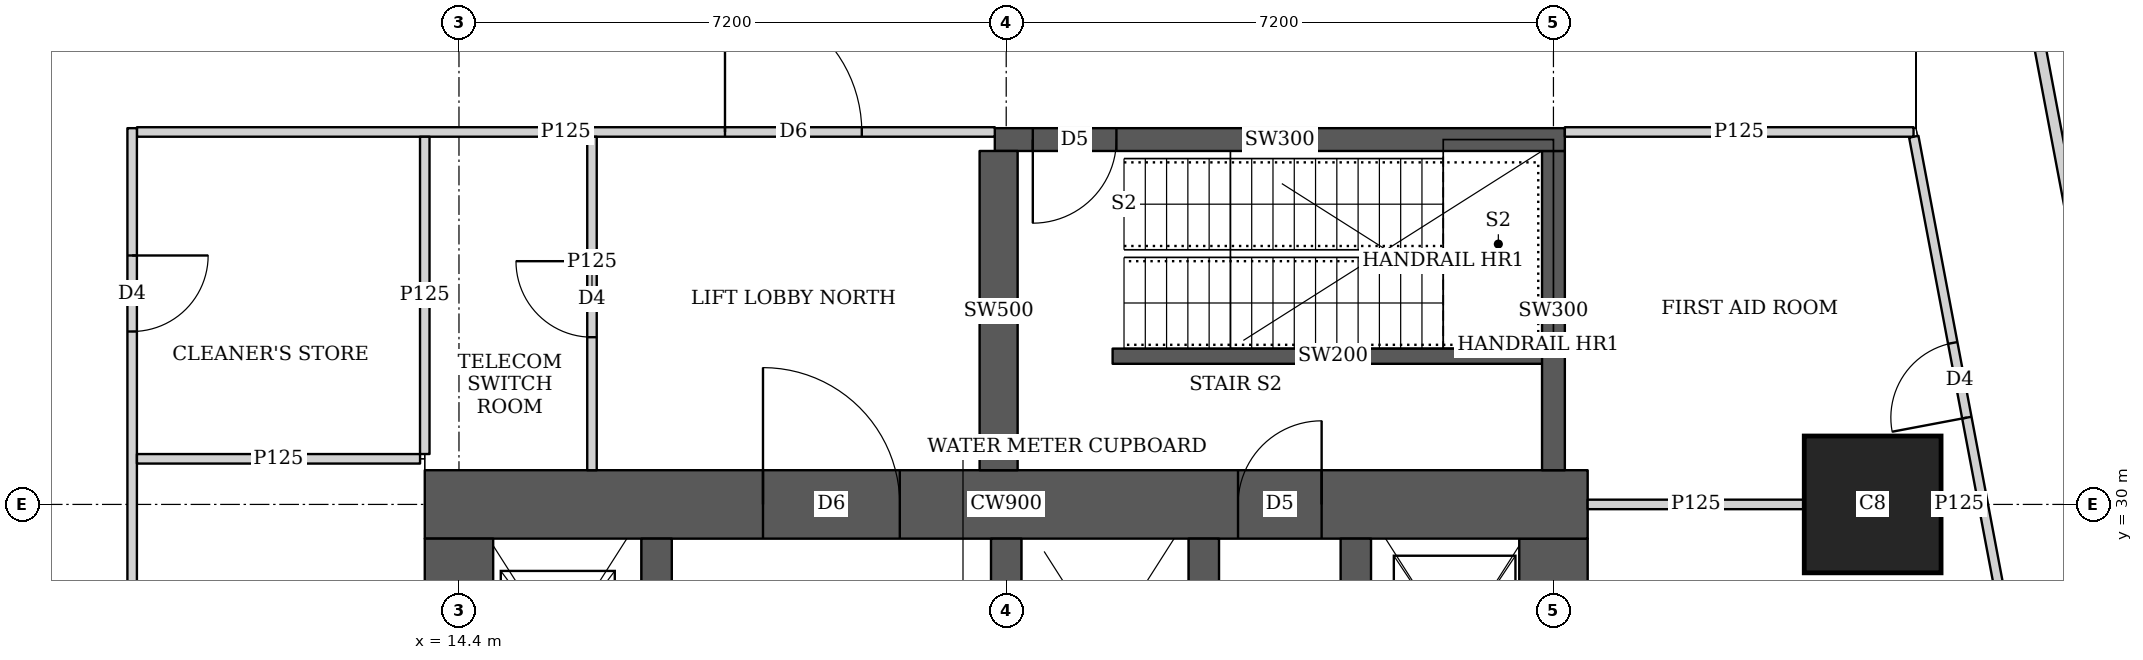
"""IFC4 building model, lengths in metres.
Left out: names, types, materials, properties, quantities, classifications, styles, units other than length and angle.
Written with IfcOpenShell. Run it as: python <this file> out.ifc"""

import sys

from ifc_helpers import new_model, si_unit, direction, frame, frame_2d, origin, origin_2d, place, context, subcontext, project, spatial, rectangle, extrude, element, fill, save


model = new_model("IFC4")
c1 = context("Model", 3, precision=1e-05, world=origin(), true_north=direction((0.0, 1.0)))
c2 = subcontext(c1, "Body", "Model", "MODEL_VIEW")
j1 = project(units=[si_unit("LENGTHUNIT", "METRE"), si_unit("PLANEANGLEUNIT", "RADIAN")], contexts=[c1])
p1 = place(None, origin())
s1 = spatial("IfcSite", under=j1, at=p1, CompositionType="ELEMENT")
p2 = place(p1, origin())
s2 = spatial("IfcBuilding", under=s1, at=p2, CompositionType="ELEMENT")
p3 = place(p2, frame((0.0, 0.0, 72.5)))
s3 = spatial("IfcBuildingStorey", under=s2, at=p3, CompositionType="ELEMENT", Elevation=72.5)
p4 = place(p3, frame((33.0, 30.0, 0.0), z_axis=(0.0, 0.0, 1.0), x_axis=(1.0, 0.0, 0.0)))
e1 = element("IfcColumn", 1, at=p4, inside=s3, PredefinedType="COLUMN", context=c2, shape_type="SweptSolid", body=[
    extrude(rectangle(XDim=1.8, YDim=1.8, at=origin_2d()), origin(), (0.0, 0.0, 1.0), 5.4),
])
p5 = place(p3, frame((13.95, 30.0, 0.0), z_axis=(0.0, 0.0, 1.0), x_axis=(1.0, 0.0, 0.0)))
e2 = element("IfcWall", 2, at=p5, inside=s3, PredefinedType="SHEAR", context=c2, shape_type="SweptSolid", body=[
    extrude(rectangle(XDim=15.3, YDim=0.9, at=frame_2d((7.65, 0.0))), origin(), (0.0, 0.0, 1.0), 5.4),
])
p6 = place(p5, frame((4.45, 0.0, 0.0)))
e3 = element("IfcOpeningElement", 3, at=p6, cuts=e2, PredefinedType="OPENING", context=c2, shape_type="SweptSolid", body=[
    extrude(rectangle(XDim=1.8, YDim=2.1, at=frame_2d((0.9, 1.05))), frame((0.0, 0.46, 0.0), z_axis=(0.0, -1.0, 0.0), x_axis=(1.0, 0.0, 0.0)), (0.0, 0.0, 1.0), 0.92),
])
p7 = place(p5, frame((10.7, 0.0, 0.0)))
e4 = element("IfcOpeningElement", 4, at=p7, cuts=e2, PredefinedType="OPENING", context=c2, shape_type="SweptSolid", body=[
    extrude(rectangle(XDim=1.1, YDim=2.1, at=frame_2d((0.55, 1.05))), frame((0.0, 0.46, 0.0), z_axis=(0.0, -1.0, 0.0), x_axis=(1.0, 0.0, 0.0)), (0.0, 0.0, 1.0), 0.92),
])
for number, where, z_axis, x_axis in (
    (5, (14.4, 15.45, 0.0), (0.0, 0.0, 1.0), (0.0, 1.0, 0.0)),
    (6, (28.8, 15.45, 0.0), (0.0, 0.0, 1.0), (0.0, 1.0, 0.0)),
):
    element("IfcWall", number, at=place(p3, frame(where, z_axis=z_axis, x_axis=x_axis)), inside=s3, PredefinedType="SHEAR", context=c2, shape_type="SweptSolid", body=[
        extrude(rectangle(XDim=14.1, YDim=0.9, at=frame_2d((7.05, 0.0))), origin(), (0.0, 0.0, 1.0), 5.4),
    ])
p8 = place(p3, frame((17.0, 15.45, 0.0), z_axis=(0.0, 0.0, 1.0), x_axis=(0.0, 1.0, 0.0)))
e7 = element("IfcWall", 7, at=p8, inside=s3, PredefinedType="SHEAR", context=c2, shape_type="SweptSolid", body=[
    extrude(rectangle(XDim=14.1, YDim=0.4, at=frame_2d((7.05, 0.0))), origin(), (0.0, 0.0, 1.0), 5.4),
])
p9 = place(p8, frame((0.875, 0.0, 0.0)))
e8 = element("IfcOpeningElement", 8, at=p9, cuts=e7, PredefinedType="OPENING", context=c2, shape_type="SweptSolid", body=[
    extrude(rectangle(XDim=1.1, YDim=2.1, at=frame_2d((0.55, 1.05))), frame((0.0, 0.21, 0.0), z_axis=(0.0, -1.0, 0.0), x_axis=(1.0, 0.0, 0.0)), (0.0, 0.0, 1.0), 0.42),
])
p10 = place(p8, frame((4.625, 0.0, 0.0)))
e9 = element("IfcOpeningElement", 9, at=p10, cuts=e7, PredefinedType="OPENING", context=c2, shape_type="SweptSolid", body=[
    extrude(rectangle(XDim=1.1, YDim=2.1, at=frame_2d((0.55, 1.05))), frame((0.0, 0.21, 0.0), z_axis=(0.0, -1.0, 0.0), x_axis=(1.0, 0.0, 0.0)), (0.0, 0.0, 1.0), 0.42),
])
p11 = place(p8, frame((8.375, 0.0, 0.0)))
e10 = element("IfcOpeningElement", 10, at=p11, cuts=e7, PredefinedType="OPENING", context=c2, shape_type="SweptSolid", body=[
    extrude(rectangle(XDim=1.1, YDim=2.1, at=frame_2d((0.55, 1.05))), frame((0.0, 0.21, 0.0), z_axis=(0.0, -1.0, 0.0), x_axis=(1.0, 0.0, 0.0)), (0.0, 0.0, 1.0), 0.42),
])
p12 = place(p8, frame((12.125, 0.0, 0.0)))
e11 = element("IfcOpeningElement", 11, at=p12, cuts=e7, PredefinedType="OPENING", context=c2, shape_type="SweptSolid", body=[
    extrude(rectangle(XDim=1.1, YDim=2.1, at=frame_2d((0.55, 1.05))), frame((0.0, 0.21, 0.0), z_axis=(0.0, -1.0, 0.0), x_axis=(1.0, 0.0, 0.0)), (0.0, 0.0, 1.0), 0.42),
])
for number, where, z_axis, x_axis in (
    (12, (21.6, 15.45, 0.0), (0.0, 0.0, 1.0), (0.0, 1.0, 0.0)),
    (13, (24.2, 15.45, 0.0), (0.0, 0.0, 1.0), (0.0, 1.0, 0.0)),
):
    element("IfcWall", number, at=place(p3, frame(where, z_axis=z_axis, x_axis=x_axis)), inside=s3, PredefinedType="SHEAR", context=c2, shape_type="SweptSolid", body=[
        extrude(rectangle(XDim=14.1, YDim=0.4, at=frame_2d((7.05, 0.0))), origin(), (0.0, 0.0, 1.0), 5.4),
    ])
p13 = place(p3, frame((26.2, 26.45, 0.0), z_axis=(0.0, 0.0, 1.0), x_axis=(0.0, 1.0, 0.0)))
e14 = element("IfcWall", 14, at=p13, inside=s3, PredefinedType="SHEAR", context=c2, shape_type="SweptSolid", body=[
    extrude(rectangle(XDim=3.1, YDim=0.4, at=frame_2d((1.55, 0.0))), origin(), (0.0, 0.0, 1.0), 5.4),
])
p14 = place(p13, frame((1.075, 0.0, 0.0)))
e15 = element("IfcOpeningElement", 15, at=p14, cuts=e14, PredefinedType="OPENING", context=c2, shape_type="SweptSolid", body=[
    extrude(rectangle(XDim=1.2, YDim=2.1, at=frame_2d((0.6, 1.05))), frame((0.0, 0.21, 0.0), z_axis=(0.0, -1.0, 0.0), x_axis=(1.0, 0.0, 0.0)), (0.0, 0.0, 1.0), 0.42),
])
p15 = place(p3, frame((21.45, 34.8, 0.0), z_axis=(0.0, 0.0, 1.0), x_axis=(1.0, 0.0, 0.0)))
e16 = element("IfcWall", 16, at=p15, inside=s3, PredefinedType="SHEAR", context=c2, shape_type="SweptSolid", body=[
    extrude(rectangle(XDim=7.5, YDim=0.3, at=frame_2d((3.75, 0.0))), origin(), (0.0, 0.0, 1.0), 5.4),
])
p16 = place(p15, frame((0.5, 0.0, 0.0)))
e17 = element("IfcOpeningElement", 17, at=p16, cuts=e16, PredefinedType="OPENING", context=c2, shape_type="SweptSolid", body=[
    extrude(rectangle(XDim=1.1, YDim=2.1, at=frame_2d((0.55, 1.05))), frame((0.0, 0.16, 0.0), z_axis=(0.0, -1.0, 0.0), x_axis=(1.0, 0.0, 0.0)), (0.0, 0.0, 1.0), 0.32),
])
p17 = place(p3, frame((21.5, 30.45, 0.0), z_axis=(0.0, 0.0, 1.0), x_axis=(0.0, 1.0, 0.0)))
e18 = element("IfcWall", 18, at=p17, inside=s3, PredefinedType="SHEAR", context=c2, shape_type="SweptSolid", body=[
    extrude(rectangle(XDim=4.2, YDim=0.5, at=frame_2d((2.1, 0.0))), origin(), (0.0, 0.0, 1.0), 5.4),
])
p18 = place(p3, frame((28.8, 30.45, 0.0), z_axis=(0.0, 0.0, 1.0), x_axis=(0.0, 1.0, 0.0)))
e19 = element("IfcWall", 19, at=p18, inside=s3, PredefinedType="SHEAR", context=c2, shape_type="SweptSolid", body=[
    extrude(rectangle(XDim=4.2, YDim=0.3, at=frame_2d((2.1, 0.0))), origin(), (0.0, 0.0, 1.0), 5.4),
])
p19 = place(p3, frame((35.094, 36.585, 0.0), z_axis=(0.0, 0.0, 1.0), x_axis=(0.185591455861, -0.982626995106, 0.0)))
e20 = element("IfcWall", 20, at=p19, inside=s3, PredefinedType="SOLIDWALL", context=c2, shape_type="SweptSolid", body=[
    extrude(rectangle(XDim=35.735, YDim=0.15, at=frame_2d((17.867, 0.0))), origin(), (0.0, 0.0, 1.0), 3.35),
])
p20 = place(p19, frame((15.15, 0.0, 0.0)))
e21 = element("IfcOpeningElement", 21, at=p20, cuts=e20, PredefinedType="OPENING", context=c2, shape_type="SweptSolid", body=[
    extrude(rectangle(XDim=1.0, YDim=2.1, at=frame_2d((0.5, 1.05))), frame((0.0, 0.085, 0.0), z_axis=(0.0, -1.0, 0.0), x_axis=(1.0, 0.0, 0.0)), (0.0, 0.0, 1.0), 0.17),
])
p21 = place(p3, frame((10.1, 10.05, 0.0), z_axis=(0.0, 0.0, 1.0), x_axis=(0.0, 1.0, 0.0)))
e22 = element("IfcWall", 22, at=p21, inside=s3, PredefinedType="PARTITIONING", context=c2, shape_type="SweptSolid", body=[
    extrude(rectangle(XDim=24.9, YDim=0.125, at=frame_2d((12.45, 0.0))), origin(), (0.0, 0.0, 1.0), 3.55),
])
p22 = place(p21, frame((1.675, 0.0, 0.0)))
e23 = element("IfcOpeningElement", 23, at=p22, cuts=e22, PredefinedType="OPENING", context=c2, shape_type="SweptSolid", body=[
    extrude(rectangle(XDim=1.0, YDim=2.1, at=frame_2d((0.5, 1.05))), frame((0.0, 0.073, 0.0), z_axis=(0.0, -1.0, 0.0), x_axis=(1.0, 0.0, 0.0)), (0.0, 0.0, 1.0), 0.145),
])
p23 = place(p21, frame((16.0, 0.0, 0.0)))
e24 = element("IfcOpeningElement", 24, at=p23, cuts=e22, PredefinedType="OPENING", context=c2, shape_type="SweptSolid", body=[
    extrude(rectangle(XDim=1.0, YDim=2.1, at=frame_2d((0.5, 1.05))), frame((0.0, 0.073, 0.0), z_axis=(0.0, -1.0, 0.0), x_axis=(1.0, 0.0, 0.0)), (0.0, 0.0, 1.0), 0.145),
])
p24 = place(p21, frame((22.225, 0.0, 0.0)))
e25 = element("IfcOpeningElement", 25, at=p24, cuts=e22, PredefinedType="OPENING", context=c2, shape_type="SweptSolid", body=[
    extrude(rectangle(XDim=1.0, YDim=2.1, at=frame_2d((0.5, 1.05))), frame((0.0, 0.073, 0.0), z_axis=(0.0, -1.0, 0.0), x_axis=(1.0, 0.0, 0.0)), (0.0, 0.0, 1.0), 0.145),
])
p25 = place(p21, frame((6.025, 0.0, 0.0)))
e26 = element("IfcOpeningElement", 26, at=p25, cuts=e22, PredefinedType="OPENING", context=c2, shape_type="SweptSolid", body=[
    extrude(rectangle(XDim=1.0, YDim=2.1, at=frame_2d((0.5, 1.05))), frame((0.0, 0.073, 0.0), z_axis=(0.0, -1.0, 0.0), x_axis=(1.0, 0.0, 0.0)), (0.0, 0.0, 1.0), 0.145),
])
p26 = place(p21, frame((9.325, 0.0, 0.0)))
e27 = element("IfcOpeningElement", 27, at=p26, cuts=e22, PredefinedType="OPENING", context=c2, shape_type="SweptSolid", body=[
    extrude(rectangle(XDim=1.0, YDim=2.1, at=frame_2d((0.5, 1.05))), frame((0.0, 0.073, 0.0), z_axis=(0.0, -1.0, 0.0), x_axis=(1.0, 0.0, 0.0)), (0.0, 0.0, 1.0), 0.145),
])
p27 = place(p21, frame((11.1, 0.0, 0.0)))
e28 = element("IfcOpeningElement", 28, at=p27, cuts=e22, PredefinedType="OPENING", context=c2, shape_type="SweptSolid", body=[
    extrude(rectangle(XDim=1.0, YDim=2.1, at=frame_2d((0.5, 1.05))), frame((0.0, 0.073, 0.0), z_axis=(0.0, -1.0, 0.0), x_axis=(1.0, 0.0, 0.0)), (0.0, 0.0, 1.0), 0.145),
])
p28 = place(p3, frame((10.163, 30.6, 0.0), z_axis=(0.0, 0.0, 1.0), x_axis=(1.0, 0.0, 0.0)))
e29 = element("IfcWall", 29, at=p28, inside=s3, PredefinedType="PARTITIONING", context=c2, shape_type="SweptSolid", body=[
    extrude(rectangle(XDim=3.725, YDim=0.125, at=frame_2d((1.862, 0.0))), origin(), (0.0, 0.0, 1.0), 3.55),
])
p29 = place(p3, frame((13.95, 30.663, 0.0), z_axis=(0.0, 0.0, 1.0), x_axis=(0.0, 1.0, 0.0)))
e30 = element("IfcWall", 30, at=p29, inside=s3, PredefinedType="PARTITIONING", context=c2, shape_type="SweptSolid", body=[
    extrude(rectangle(XDim=4.174, YDim=0.125, at=frame_2d((2.087, 0.0))), origin(), (0.0, 0.0, 1.0), 3.55),
])
p30 = place(p3, frame((10.163, 34.9, 0.0), z_axis=(0.0, 0.0, 1.0), x_axis=(1.0, 0.0, 0.0)))
e31 = element("IfcWall", 31, at=p30, inside=s3, PredefinedType="PARTITIONING", context=c2, shape_type="SweptSolid", body=[
    extrude(rectangle(XDim=11.287, YDim=0.125, at=frame_2d((5.644, 0.0))), origin(), (0.0, 0.0, 1.0), 3.15),
])
p31 = place(p30, frame((7.737, 0.0, 0.0)))
e32 = element("IfcOpeningElement", 32, at=p31, cuts=e31, PredefinedType="OPENING", context=c2, shape_type="SweptSolid", body=[
    extrude(rectangle(XDim=1.8, YDim=2.1, at=frame_2d((0.9, 1.05))), frame((0.0, 0.073, 0.0), z_axis=(0.0, -1.0, 0.0), x_axis=(1.0, 0.0, 0.0)), (0.0, 0.0, 1.0), 0.145),
])
p32 = place(p3, frame((16.15, 30.45, 0.0), z_axis=(0.0, 0.0, 1.0), x_axis=(0.0, 1.0, 0.0)))
e33 = element("IfcWall", 33, at=p32, inside=s3, PredefinedType="PARTITIONING", context=c2, shape_type="SweptSolid", body=[
    extrude(rectangle(XDim=4.387, YDim=0.125, at=frame_2d((2.193, 0.0))), origin(), (0.0, 0.0, 1.0), 5.15),
])
p33 = place(p32, frame((1.75, 0.0, 0.0)))
e34 = element("IfcOpeningElement", 34, at=p33, cuts=e33, PredefinedType="OPENING", context=c2, shape_type="SweptSolid", body=[
    extrude(rectangle(XDim=1.0, YDim=2.1, at=frame_2d((0.5, 1.05))), frame((0.0, 0.073, 0.0), z_axis=(0.0, -1.0, 0.0), x_axis=(1.0, 0.0, 0.0)), (0.0, 0.0, 1.0), 0.145),
])
p34 = place(p3, frame((28.95, 34.9, 0.0), z_axis=(0.0, 0.0, 1.0), x_axis=(1.0, 0.0, 0.0)))
e35 = element("IfcWall", 35, at=p34, inside=s3, PredefinedType="PARTITIONING", context=c2, shape_type="SweptSolid", body=[
    extrude(rectangle(XDim=4.588, YDim=0.125, at=frame_2d((2.294, 0.0))), origin(), (0.0, 0.0, 1.0), 3.15),
])
p35 = place(p3, frame((38.202, 10.163, 0.0), z_axis=(0.0, 0.0, 1.0), x_axis=(-0.185610321132, 0.982623431783, 0.0)))
e36 = element("IfcWall", 36, at=p35, inside=s3, PredefinedType="PARTITIONING", context=c2, shape_type="SweptSolid", body=[
    extrude(rectangle(XDim=25.111, YDim=0.125, at=frame_2d((12.556, 0.0))), origin(), (0.0, 0.0, 1.0), 3.55),
])
p36 = place(p35, frame((0.708, 0.0, 0.0)))
e37 = element("IfcOpeningElement", 37, at=p36, cuts=e36, PredefinedType="OPENING", context=c2, shape_type="SweptSolid", body=[
    extrude(rectangle(XDim=1.0, YDim=2.1, at=frame_2d((0.5, 1.05))), frame((0.0, 0.073, 0.0), z_axis=(0.0, -1.0, 0.0), x_axis=(1.0, 0.0, 0.0)), (0.0, 0.0, 1.0), 0.145),
])
p37 = place(p35, frame((6.1, 0.0, 0.0)))
e38 = element("IfcOpeningElement", 38, at=p37, cuts=e36, PredefinedType="OPENING", context=c2, shape_type="SweptSolid", body=[
    extrude(rectangle(XDim=1.0, YDim=2.1, at=frame_2d((0.5, 1.05))), frame((0.0, 0.073, 0.0), z_axis=(0.0, -1.0, 0.0), x_axis=(1.0, 0.0, 0.0)), (0.0, 0.0, 1.0), 0.145),
])
p38 = place(p35, frame((13.378, 0.0, 0.0)))
e39 = element("IfcOpeningElement", 39, at=p38, cuts=e36, PredefinedType="OPENING", context=c2, shape_type="SweptSolid", body=[
    extrude(rectangle(XDim=1.0, YDim=2.1, at=frame_2d((0.5, 1.05))), frame((0.0, 0.073, 0.0), z_axis=(0.0, -1.0, 0.0), x_axis=(1.0, 0.0, 0.0)), (0.0, 0.0, 1.0), 0.145),
])
p39 = place(p35, frame((21.35, 0.0, 0.0)))
e40 = element("IfcOpeningElement", 40, at=p39, cuts=e36, PredefinedType="OPENING", context=c2, shape_type="SweptSolid", body=[
    extrude(rectangle(XDim=1.0, YDim=2.1, at=frame_2d((0.5, 1.05))), frame((0.0, 0.073, 0.0), z_axis=(0.0, -1.0, 0.0), x_axis=(1.0, 0.0, 0.0)), (0.0, 0.0, 1.0), 0.145),
])
p40 = place(p3, frame((29.25, 30.0, 0.0), z_axis=(0.0, 0.0, 1.0), x_axis=(1.0, 0.0, 0.0)))
e41 = element("IfcWall", 41, at=p40, inside=s3, PredefinedType="PARTITIONING", context=c2, shape_type="SweptSolid", body=[
    extrude(rectangle(XDim=2.849, YDim=0.125, at=frame_2d((1.425, 0.0))), origin(), (0.0, 0.0, 1.0), 3.55),
])
p41 = place(p3, frame((33.901, 30.0, 0.0), z_axis=(0.0, 0.0, 1.0), x_axis=(1.0, 0.0, 0.0)))
e42 = element("IfcWall", 42, at=p41, inside=s3, PredefinedType="PARTITIONING", context=c2, shape_type="SweptSolid", body=[
    extrude(rectangle(XDim=0.478, YDim=0.125, at=frame_2d((0.239, 0.0))), origin(), (0.0, 0.0, 1.0), 3.55),
])
p42 = place(p3, frame((23.0, 31.95, 0.0), z_axis=(0.0, 0.0, 1.0), x_axis=(1.0, 0.0, 0.0)))
e43 = element("IfcWall", 43, at=p42, inside=s3, PredefinedType="SHEAR", context=c2, shape_type="SweptSolid", body=[
    extrude(rectangle(XDim=5.8, YDim=0.2, at=frame_2d((2.9, 0.0))), origin(), (0.0, 0.0, 1.0), 5.4),
])
p43 = place(p24, origin())
e44 = element("IfcDoor", 44, at=p43, inside=s3, OperationType="SINGLE_SWING_LEFT", PredefinedType="DOOR", context=c2, shape_type="SweptSolid", body=[
    extrude(rectangle(XDim=1.0, YDim=2.1, at=frame_2d((0.5, 1.05))), frame((0.0, 0.025, 0.0), z_axis=(0.0, -1.0, 0.0), x_axis=(1.0, 0.0, 0.0)), (0.0, 0.0, 1.0), 0.05),
])
fill(e25, e44)
p44 = place(p33, origin())
e45 = element("IfcDoor", 45, at=p44, inside=s3, OperationType="SINGLE_SWING_RIGHT", PredefinedType="DOOR", context=c2, shape_type="SweptSolid", body=[
    extrude(rectangle(XDim=1.0, YDim=2.1, at=frame_2d((0.5, 1.05))), frame((0.0, 0.025, 0.0), z_axis=(0.0, -1.0, 0.0), x_axis=(1.0, 0.0, 0.0)), (0.0, 0.0, 1.0), 0.05),
])
fill(e34, e45)
p45 = place(p31, origin())
e46 = element("IfcDoor", 46, at=p45, inside=s3, OperationType="DOUBLE_DOOR_SINGLE_SWING", PredefinedType="DOOR", context=c2, shape_type="SweptSolid", body=[
    extrude(rectangle(XDim=1.8, YDim=2.1, at=frame_2d((0.9, 1.05))), frame((0.0, 0.025, 0.0), z_axis=(0.0, -1.0, 0.0), x_axis=(1.0, 0.0, 0.0)), (0.0, 0.0, 1.0), 0.05),
])
fill(e32, e46)
p46 = place(p39, origin())
e47 = element("IfcDoor", 47, at=p46, inside=s3, OperationType="SINGLE_SWING_LEFT", PredefinedType="DOOR", context=c2, shape_type="SweptSolid", body=[
    extrude(rectangle(XDim=1.0, YDim=2.1, at=frame_2d((0.5, 1.05))), frame((0.0, 0.025, 0.0), z_axis=(0.0, -1.0, 0.0), x_axis=(1.0, 0.0, 0.0)), (0.0, 0.0, 1.0), 0.05),
])
fill(e40, e47)
p47 = place(p6, origin())
e48 = element("IfcDoor", 48, at=p47, inside=s3, OperationType="DOUBLE_DOOR_SINGLE_SWING", PredefinedType="DOOR", context=c2, shape_type="SweptSolid", body=[
    extrude(rectangle(XDim=1.8, YDim=2.1, at=frame_2d((0.9, 1.05))), frame((0.0, 0.025, 0.0), z_axis=(0.0, -1.0, 0.0), x_axis=(1.0, 0.0, 0.0)), (0.0, 0.0, 1.0), 0.05),
])
fill(e3, e48)
p48 = place(p7, origin())
e49 = element("IfcDoor", 49, at=p48, inside=s3, OperationType="SINGLE_SWING_RIGHT", PredefinedType="DOOR", context=c2, shape_type="SweptSolid", body=[
    extrude(rectangle(XDim=1.1, YDim=2.1, at=frame_2d((0.55, 1.05))), frame((0.0, 0.025, 0.0), z_axis=(0.0, -1.0, 0.0), x_axis=(1.0, 0.0, 0.0)), (0.0, 0.0, 1.0), 0.05),
])
fill(e4, e49)
p49 = place(p16, origin())
e50 = element("IfcDoor", 50, at=p49, inside=s3, OperationType="SINGLE_SWING_RIGHT", PredefinedType="DOOR", context=c2, shape_type="SweptSolid", body=[
    extrude(rectangle(XDim=1.1, YDim=2.1, at=frame_2d((0.55, 1.05))), frame((0.0, 0.025, 0.0), z_axis=(0.0, -1.0, 0.0), x_axis=(1.0, 0.0, 0.0)), (0.0, 0.0, 1.0), 0.05),
])
fill(e17, e50)
save(model, sys.argv[1])
